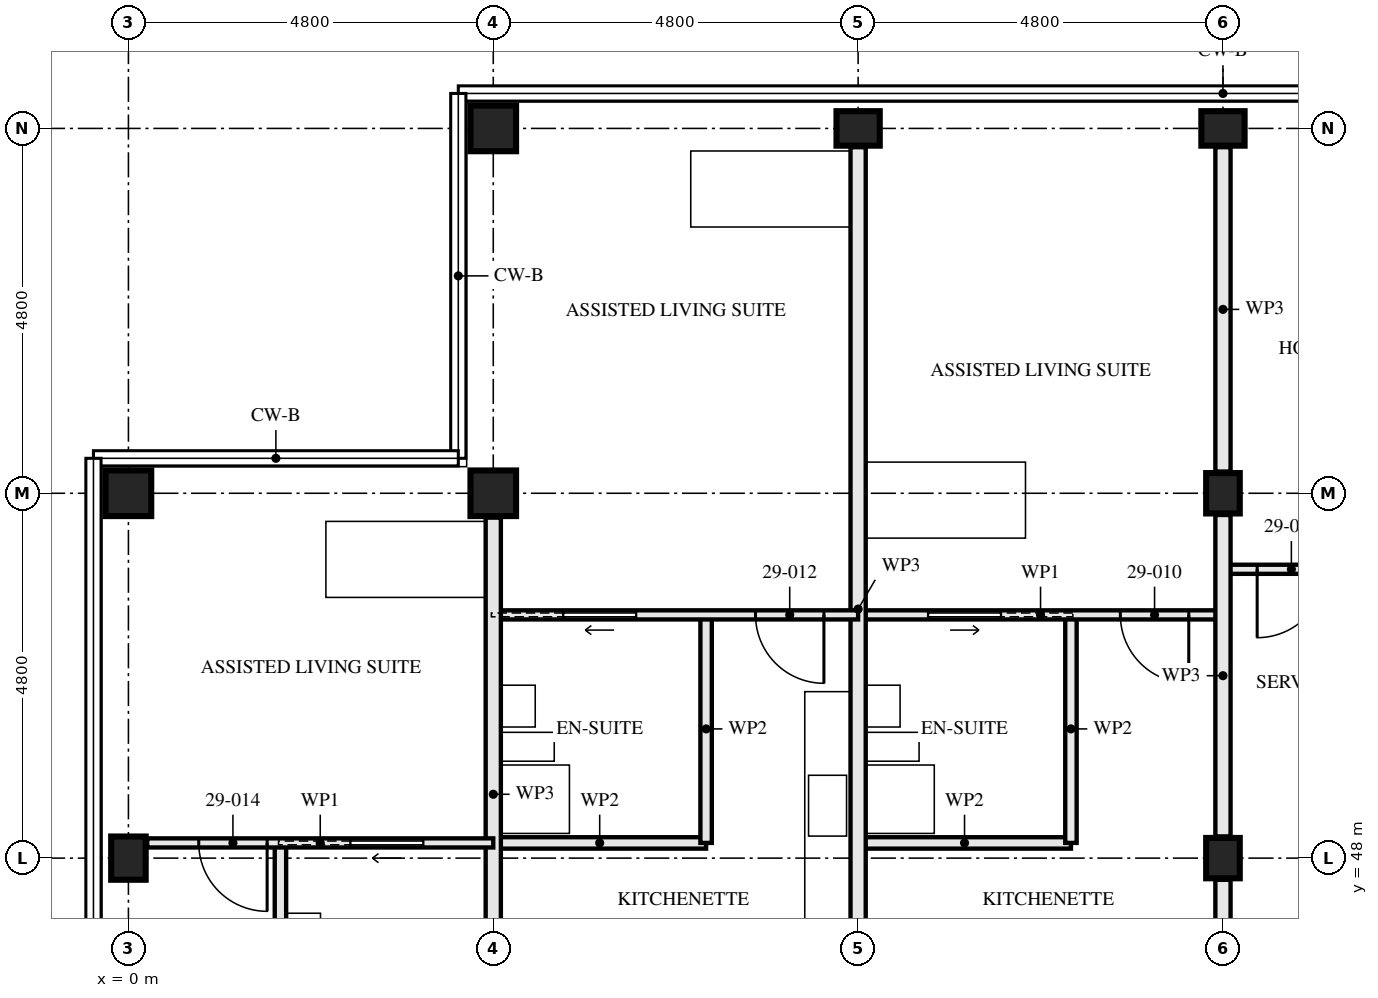
"""IFC4 building model, lengths in metres.
Left out: names, types, materials, properties, quantities, classifications, styles, units other than length and angle.
Written with IfcOpenShell. Run it as: python <this file> out.ifc"""

import sys

from ifc_helpers import new_model, si_unit, direction, frame, frame_2d, origin, origin_2d, place, context, subcontext, project, spatial, rectangle, hollow_rectangle, i_section, extrude, element, fill, save


model = new_model("IFC4")
c1 = context("Model", 3, precision=1e-05, world=origin(), true_north=direction((0.0, 1.0)))
c2 = subcontext(c1, "Body", "Model", "MODEL_VIEW")
j1 = project(units=[si_unit("LENGTHUNIT", "METRE"), si_unit("PLANEANGLEUNIT", "RADIAN")], contexts=[c1])
p1 = place(None, origin())
s1 = spatial("IfcSite", under=j1, at=p1, CompositionType="ELEMENT")
p2 = place(p1, origin())
s2 = spatial("IfcBuilding", under=s1, at=p2, CompositionType="ELEMENT")
p3 = place(p2, frame((0.0, 0.0, 108.5)))
s3 = spatial("IfcBuildingStorey", under=s2, at=p3, CompositionType="ELEMENT", Elevation=108.5)
p4 = place(p3, frame((0.0, 48.0, 0.0), z_axis=(0.0, 0.0, 1.0), x_axis=(1.0, 0.0, 0.0)))
e1 = element("IfcColumn", 1, at=p4, inside=s3, PredefinedType="COLUMN", context=c2, shape_type="SweptSolid", body=[
    extrude(i_section(OverallWidth=0.454, OverallDepth=0.569, WebThickness=0.078, FlangeThickness=0.125, FilletRadius=0.015, at=origin_2d()), origin(), (0.0, 0.0, 1.0), 3.5),
])
for number, where, z_axis, x_axis in (
    (2, (0.0, 52.8, 0.0), (0.0, 0.0, 1.0), (0.0, 1.0, 0.0)),
    (3, (4.8, 52.8, 0.0), (0.0, 0.0, 1.0), (0.0, 1.0, 0.0)),
    (4, (4.8, 57.6, 0.0), (0.0, 0.0, 1.0), (0.0, 1.0, 0.0)),
):
    element("IfcColumn", number, at=place(p3, frame(where, z_axis=z_axis, x_axis=x_axis)), inside=s3, PredefinedType="COLUMN", context=c2, shape_type="SweptSolid", body=[
        extrude(hollow_rectangle(XDim=0.6, YDim=0.6, WallThickness=0.05, at=origin_2d()), origin(), (0.0, 0.0, 1.0), 3.5),
    ])
p5 = place(p3, frame((9.6, 57.6, 0.0), z_axis=(0.0, 0.0, 1.0), x_axis=(0.0, 1.0, 0.0)))
e5 = element("IfcColumn", 5, at=p5, inside=s3, PredefinedType="COLUMN", context=c2, shape_type="SweptSolid", body=[
    extrude(i_section(OverallWidth=0.454, OverallDepth=0.569, WebThickness=0.078, FlangeThickness=0.125, FilletRadius=0.015, at=origin_2d()), origin(), (0.0, 0.0, 1.0), 3.5),
])
for number, where, z_axis, x_axis in (
    (6, (14.4, 48.0, 0.0), (0.0, 0.0, 1.0), (1.0, 0.0, 0.0)),
    (7, (14.4, 52.8, 0.0), (0.0, 0.0, 1.0), (1.0, 0.0, 0.0)),
):
    element("IfcColumn", number, at=place(p3, frame(where, z_axis=z_axis, x_axis=x_axis)), inside=s3, PredefinedType="COLUMN", context=c2, shape_type="SweptSolid", body=[
        extrude(i_section(OverallWidth=0.442, OverallDepth=0.531, WebThickness=0.066, FlangeThickness=0.106, FilletRadius=0.015, at=origin_2d()), origin(), (0.0, 0.0, 1.0), 3.5),
    ])
p6 = place(p3, frame((14.4, 57.6, 0.0), z_axis=(0.0, 0.0, 1.0), x_axis=(0.0, 1.0, 0.0)))
e8 = element("IfcColumn", 8, at=p6, inside=s3, PredefinedType="COLUMN", context=c2, shape_type="SweptSolid", body=[
    extrude(i_section(OverallWidth=0.454, OverallDepth=0.569, WebThickness=0.078, FlangeThickness=0.125, FilletRadius=0.015, at=origin_2d()), origin(), (0.0, 0.0, 1.0), 3.5),
])
p7 = place(p3, frame((12.4, 51.2, 0.0), z_axis=(0.0, 0.0, 1.0), x_axis=(0.0, -1.0, 0.0)))
e9 = element("IfcWall", 9, at=p7, inside=s3, PredefinedType="PARTITIONING", context=c2, shape_type="SweptSolid", body=[
    extrude(rectangle(XDim=3.0, YDim=0.15, at=frame_2d((1.5, 0.0))), origin(), (0.0, 0.0, 1.0), 3.33),
])
p8 = place(p3, frame((12.4, 48.2, 0.0), z_axis=(0.0, 0.0, 1.0), x_axis=(-1.0, 0.0, 0.0)))
e10 = element("IfcWall", 10, at=p8, inside=s3, PredefinedType="PARTITIONING", context=c2, shape_type="SweptSolid", body=[
    extrude(rectangle(XDim=2.8, YDim=0.15, at=frame_2d((1.4, 0.0))), origin(), (0.0, 0.0, 1.0), 3.33),
])
p9 = place(p3, frame((14.4, 51.2, 0.0), z_axis=(0.0, 0.0, 1.0), x_axis=(-1.0, 0.0, 0.0)))
e11 = element("IfcWall", 11, at=p9, inside=s3, PredefinedType="PARTITIONING", context=c2, shape_type="SweptSolid", body=[
    extrude(rectangle(XDim=4.8, YDim=0.12, at=frame_2d((2.4, 0.0))), origin(), (0.0, 0.0, 1.0), 3.33),
])
p10 = place(p9, frame((0.45, 0.0, 0.0)))
e12 = element("IfcOpeningElement", 12, at=p10, cuts=e11, PredefinedType="OPENING", context=c2, shape_type="SweptSolid", body=[
    extrude(rectangle(XDim=0.9, YDim=2.1, at=frame_2d((0.45, 1.05))), frame((0.0, 0.071, 0.0), z_axis=(0.0, -1.0, 0.0), x_axis=(1.0, 0.0, 0.0)), (0.0, 0.0, 1.0), 0.141),
])
p11 = place(p9, frame((2.925, 0.0, 0.0)))
e13 = element("IfcOpeningElement", 13, at=p11, cuts=e11, PredefinedType="OPENING", context=c2, shape_type="SweptSolid", body=[
    extrude(rectangle(XDim=0.95, YDim=2.1, at=frame_2d((0.475, 1.05))), frame((0.0, 0.071, 0.0), z_axis=(0.0, -1.0, 0.0), x_axis=(1.0, 0.0, 0.0)), (0.0, 0.0, 1.0), 0.141),
])
p12 = place(p3, frame((9.6, 57.353, 0.0), z_axis=(0.0, 0.0, 1.0), x_axis=(0.0, -1.0, 0.0)))
e14 = element("IfcWall", 14, at=p12, inside=s3, PredefinedType="PARTITIONING", context=c2, shape_type="SweptSolid", body=[
    extrude(rectangle(XDim=12.153, YDim=0.2, at=frame_2d((6.077, 0.0))), origin(), (0.0, 0.0, 1.0), 2.55),
])
p13 = place(p3, frame((7.6, 51.2, 0.0), z_axis=(0.0, 0.0, 1.0), x_axis=(0.0, -1.0, 0.0)))
e15 = element("IfcWall", 15, at=p13, inside=s3, PredefinedType="PARTITIONING", context=c2, shape_type="SweptSolid", body=[
    extrude(rectangle(XDim=3.0, YDim=0.15, at=frame_2d((1.5, 0.0))), origin(), (0.0, 0.0, 1.0), 3.33),
])
p14 = place(p3, frame((7.6, 48.2, 0.0), z_axis=(0.0, 0.0, 1.0), x_axis=(-1.0, 0.0, 0.0)))
e16 = element("IfcWall", 16, at=p14, inside=s3, PredefinedType="PARTITIONING", context=c2, shape_type="SweptSolid", body=[
    extrude(rectangle(XDim=2.8, YDim=0.15, at=frame_2d((1.4, 0.0))), origin(), (0.0, 0.0, 1.0), 3.33),
])
p15 = place(p3, frame((9.6, 51.2, 0.0), z_axis=(0.0, 0.0, 1.0), x_axis=(-1.0, 0.0, 0.0)))
e17 = element("IfcWall", 17, at=p15, inside=s3, PredefinedType="PARTITIONING", context=c2, shape_type="SweptSolid", body=[
    extrude(rectangle(XDim=4.8, YDim=0.12, at=frame_2d((2.4, 0.0))), origin(), (0.0, 0.0, 1.0), 3.33),
])
p16 = place(p15, frame((0.45, 0.0, 0.0)))
e18 = element("IfcOpeningElement", 18, at=p16, cuts=e17, PredefinedType="OPENING", context=c2, shape_type="SweptSolid", body=[
    extrude(rectangle(XDim=0.9, YDim=2.1, at=frame_2d((0.45, 1.05))), frame((0.0, 0.071, 0.0), z_axis=(0.0, -1.0, 0.0), x_axis=(1.0, 0.0, 0.0)), (0.0, 0.0, 1.0), 0.141),
])
p17 = place(p15, frame((2.925, 0.0, 0.0)))
e19 = element("IfcOpeningElement", 19, at=p17, cuts=e17, PredefinedType="OPENING", context=c2, shape_type="SweptSolid", body=[
    extrude(rectangle(XDim=0.95, YDim=2.1, at=frame_2d((0.475, 1.05))), frame((0.0, 0.071, 0.0), z_axis=(0.0, -1.0, 0.0), x_axis=(1.0, 0.0, 0.0)), (0.0, 0.0, 1.0), 0.141),
])
p18 = place(p3, frame((4.8, 52.48, 0.0), z_axis=(0.0, 0.0, 1.0), x_axis=(0.0, -1.0, 0.0)))
e20 = element("IfcWall", 20, at=p18, inside=s3, PredefinedType="PARTITIONING", context=c2, shape_type="SweptSolid", body=[
    extrude(rectangle(XDim=7.28, YDim=0.2, at=frame_2d((3.64, 0.0))), origin(), (0.0, 0.0, 1.0), 2.55),
])
p19 = place(p3, frame((2.0, 48.2, 0.0), z_axis=(0.0, 0.0, 1.0), x_axis=(0.0, -1.0, 0.0)))
e21 = element("IfcWall", 21, at=p19, inside=s3, PredefinedType="PARTITIONING", context=c2, shape_type="SweptSolid", body=[
    extrude(rectangle(XDim=3.0, YDim=0.15, at=frame_2d((1.5, 0.0))), origin(), (0.0, 0.0, 1.0), 2.55),
])
p20 = place(p3, frame((4.8, 48.2, 0.0), z_axis=(0.0, 0.0, 1.0), x_axis=(-1.0, 0.0, 0.0)))
e22 = element("IfcWall", 22, at=p20, inside=s3, PredefinedType="PARTITIONING", context=c2, shape_type="SweptSolid", body=[
    extrude(rectangle(XDim=4.553, YDim=0.12, at=frame_2d((2.276, 0.0))), origin(), (0.0, 0.0, 1.0), 3.33),
])
p21 = place(p20, frame((2.975, 0.0, 0.0)))
e23 = element("IfcOpeningElement", 23, at=p21, cuts=e22, PredefinedType="OPENING", context=c2, shape_type="SweptSolid", body=[
    extrude(rectangle(XDim=0.9, YDim=2.1, at=frame_2d((0.45, 1.05))), frame((0.0, 0.071, 0.0), z_axis=(0.0, -1.0, 0.0), x_axis=(1.0, 0.0, 0.0)), (0.0, 0.0, 1.0), 0.141),
])
p22 = place(p20, frame((0.925, 0.0, 0.0)))
e24 = element("IfcOpeningElement", 24, at=p22, cuts=e22, PredefinedType="OPENING", context=c2, shape_type="SweptSolid", body=[
    extrude(rectangle(XDim=0.95, YDim=2.1, at=frame_2d((0.475, 1.05))), frame((0.0, 0.071, 0.0), z_axis=(0.0, -1.0, 0.0), x_axis=(1.0, 0.0, 0.0)), (0.0, 0.0, 1.0), 0.141),
])
p23 = place(p3, frame((19.2, 51.8, 0.0), z_axis=(0.0, 0.0, 1.0), x_axis=(-1.0, 0.0, 0.0)))
e25 = element("IfcWall", 25, at=p23, inside=s3, PredefinedType="PARTITIONING", context=c2, shape_type="SweptSolid", body=[
    extrude(rectangle(XDim=4.8, YDim=0.12, at=frame_2d((2.4, 0.0))), origin(), (0.0, 0.0, 1.0), 3.33),
])
p24 = place(p23, frame((3.45, 0.0, 0.0)))
e26 = element("IfcOpeningElement", 26, at=p24, cuts=e25, PredefinedType="OPENING", context=c2, shape_type="SweptSolid", body=[
    extrude(rectangle(XDim=0.9, YDim=2.1, at=frame_2d((0.45, 1.05))), frame((0.0, 0.071, 0.0), z_axis=(0.0, -1.0, 0.0), x_axis=(1.0, 0.0, 0.0)), (0.0, 0.0, 1.0), 0.141),
])
p25 = place(p3, frame((14.4, 45.1, 0.0), z_axis=(0.0, 0.0, 1.0), x_axis=(0.0, 1.0, 0.0)))
e27 = element("IfcWall", 27, at=p25, inside=s3, PredefinedType="PARTITIONING", context=c2, shape_type="SweptSolid", body=[
    extrude(rectangle(XDim=2.615, YDim=0.2, at=frame_2d((1.307, 0.0))), origin(), (0.0, 0.0, 1.0), 2.32),
])
p26 = place(p3, frame((14.4, 48.285, 0.0), z_axis=(0.0, 0.0, 1.0), x_axis=(0.0, 1.0, 0.0)))
e28 = element("IfcWall", 28, at=p26, inside=s3, PredefinedType="PARTITIONING", context=c2, shape_type="SweptSolid", body=[
    extrude(rectangle(XDim=4.229, YDim=0.2, at=frame_2d((2.115, 0.0))), origin(), (0.0, 0.0, 1.0), 2.32),
])
p27 = place(p3, frame((14.4, 53.085, 0.0), z_axis=(0.0, 0.0, 1.0), x_axis=(0.0, 1.0, 0.0)))
e29 = element("IfcWall", 29, at=p27, inside=s3, PredefinedType="PARTITIONING", context=c2, shape_type="SweptSolid", body=[
    extrude(rectangle(XDim=4.268, YDim=0.2, at=frame_2d((2.134, 0.0))), origin(), (0.0, 0.0, 1.0), 2.32),
])
p28 = place(p10, origin())
e30 = element("IfcDoor", 30, at=p28, inside=s3, OperationType="SINGLE_SWING_RIGHT", PredefinedType="DOOR", context=c2, shape_type="SweptSolid", body=[
    extrude(rectangle(XDim=0.9, YDim=2.1, at=frame_2d((0.45, 1.05))), frame((0.0, 0.022, 0.0), z_axis=(0.0, -1.0, 0.0), x_axis=(1.0, 0.0, 0.0)), (0.0, 0.0, 1.0), 0.044),
])
fill(e12, e30)
p29 = place(p11, origin())
e31 = element("IfcDoor", 31, at=p29, inside=s3, OperationType="SLIDING_TO_RIGHT", PredefinedType="DOOR", context=c2, shape_type="SweptSolid", body=[
    extrude(rectangle(XDim=0.95, YDim=2.1, at=frame_2d((0.475, 1.05))), frame((0.0, 0.022, 0.0), z_axis=(0.0, -1.0, 0.0), x_axis=(1.0, 0.0, 0.0)), (0.0, 0.0, 1.0), 0.044),
])
fill(e13, e31)
p30 = place(p16, origin())
e32 = element("IfcDoor", 32, at=p30, inside=s3, OperationType="SINGLE_SWING_RIGHT", PredefinedType="DOOR", context=c2, shape_type="SweptSolid", body=[
    extrude(rectangle(XDim=0.9, YDim=2.1, at=frame_2d((0.45, 1.05))), frame((0.0, 0.022, 0.0), z_axis=(0.0, -1.0, 0.0), x_axis=(1.0, 0.0, 0.0)), (0.0, 0.0, 1.0), 0.044),
])
fill(e18, e32)
p31 = place(p17, origin())
e33 = element("IfcDoor", 33, at=p31, inside=s3, OperationType="SLIDING_TO_LEFT", PredefinedType="DOOR", context=c2, shape_type="SweptSolid", body=[
    extrude(rectangle(XDim=0.95, YDim=2.1, at=frame_2d((0.475, 1.05))), frame((0.0, 0.022, 0.0), z_axis=(0.0, -1.0, 0.0), x_axis=(1.0, 0.0, 0.0)), (0.0, 0.0, 1.0), 0.044),
])
fill(e19, e33)
p32 = place(p21, origin())
e34 = element("IfcDoor", 34, at=p32, inside=s3, OperationType="SINGLE_SWING_RIGHT", PredefinedType="DOOR", context=c2, shape_type="SweptSolid", body=[
    extrude(rectangle(XDim=0.9, YDim=2.1, at=frame_2d((0.45, 1.05))), frame((0.0, 0.022, 0.0), z_axis=(0.0, -1.0, 0.0), x_axis=(1.0, 0.0, 0.0)), (0.0, 0.0, 1.0), 0.044),
])
fill(e23, e34)
p33 = place(p22, origin())
e35 = element("IfcDoor", 35, at=p33, inside=s3, OperationType="SLIDING_TO_LEFT", PredefinedType="DOOR", context=c2, shape_type="SweptSolid", body=[
    extrude(rectangle(XDim=0.95, YDim=2.1, at=frame_2d((0.475, 1.05))), frame((0.0, 0.022, 0.0), z_axis=(0.0, -1.0, 0.0), x_axis=(1.0, 0.0, 0.0)), (0.0, 0.0, 1.0), 0.044),
])
fill(e24, e35)
p34 = place(p24, origin())
e36 = element("IfcDoor", 36, at=p34, inside=s3, OperationType="SINGLE_SWING_LEFT", PredefinedType="DOOR", context=c2, shape_type="SweptSolid", body=[
    extrude(rectangle(XDim=0.9, YDim=2.1, at=frame_2d((0.45, 1.05))), frame((0.0, 0.022, 0.0), z_axis=(0.0, -1.0, 0.0), x_axis=(1.0, 0.0, 0.0)), (0.0, 0.0, 1.0), 0.044),
])
fill(e26, e36)
save(model, sys.argv[1])
